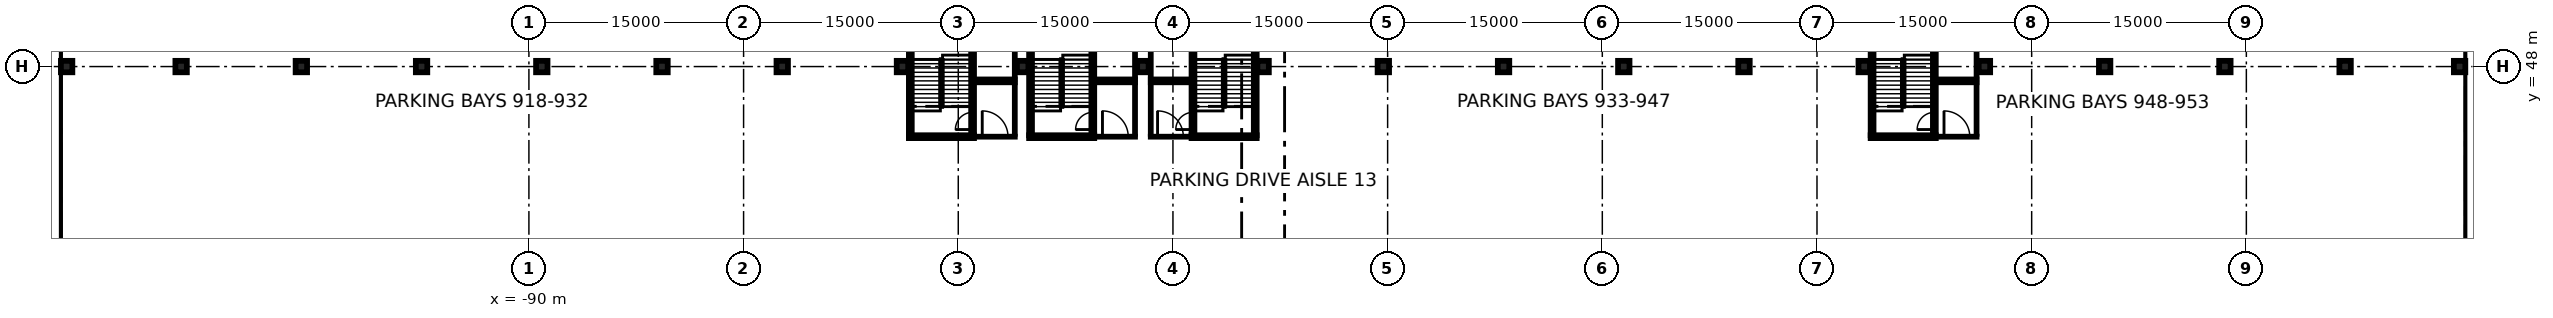
"""IFC4 building model, lengths in metres.
Left out: names, types, materials, properties, quantities, classifications, styles, units other than length and angle.
Written with IfcOpenShell. Run it as: python <this file> out.ifc"""

import sys

from ifc_helpers import new_model, si_unit, direction, frame, frame_2d, origin, origin_2d, place, context, subcontext, project, spatial, rectangle, extrude, element, fill, save


model = new_model("IFC4")
c1 = context("Model", 3, precision=1e-05, world=origin(), true_north=direction((0.0, 1.0)))
c2 = subcontext(c1, "Body", "Model", "MODEL_VIEW")
j1 = project(units=[si_unit("LENGTHUNIT", "METRE"), si_unit("PLANEANGLEUNIT", "RADIAN")], contexts=[c1])
p1 = place(None, origin())
s1 = spatial("IfcSite", under=j1, at=p1, CompositionType="ELEMENT")
p2 = place(p1, origin())
s2 = spatial("IfcBuilding", under=s1, at=p2, CompositionType="ELEMENT")
p3 = place(p2, frame((0.0, 0.0, -12.0)))
s3 = spatial("IfcBuildingStorey", under=s2, at=p3, CompositionType="ELEMENT", Elevation=-12.0)
for number, where, z_axis, x_axis in (
    (1, (-123.15, -80.0, 0.0), (0.0, 0.0, 1.0), (0.0, 1.0, 0.0)),
    (2, (45.75, -80.0, 0.0), (0.0, 0.0, 1.0), (0.0, 1.0, 0.0)),
):
    element("IfcWall", number, at=place(p3, frame(where, z_axis=z_axis, x_axis=x_axis)), inside=s3, PredefinedType="USERDEFINED", context=c2, shape_type="SweptSolid", body=[
        extrude(rectangle(XDim=160.0, YDim=0.9, at=frame_2d((80.0, 0.0))), origin(), (0.0, 0.0, 1.0), 11.55),
    ])
p4 = place(p2, frame((0.0, 0.0, -7.2)))
s4 = spatial("IfcBuildingStorey", under=s2, at=p4, CompositionType="ELEMENT", Elevation=-7.2)
for number, where, z_axis, x_axis in (
    (3, (-122.3, 48.0, -0.4), (0.0, 0.0, 1.0), (1.0, 0.0, 0.0)),
    (4, (-114.3, 48.0, -0.4), (0.0, 0.0, 1.0), (1.0, 0.0, 0.0)),
    (5, (-105.9, 48.0, -0.4), (0.0, 0.0, 1.0), (1.0, 0.0, 0.0)),
    (6, (-97.5, 48.0, -0.4), (0.0, 0.0, 1.0), (1.0, 0.0, 0.0)),
    (7, (-89.1, 48.0, -0.4), (0.0, 0.0, 1.0), (1.0, 0.0, 0.0)),
    (8, (-80.7, 48.0, -0.4), (0.0, 0.0, 1.0), (1.0, 0.0, 0.0)),
    (9, (-72.3, 48.0, -0.4), (0.0, 0.0, 1.0), (1.0, 0.0, 0.0)),
    (10, (-63.9, 48.0, -0.4), (0.0, 0.0, 1.0), (1.0, 0.0, 0.0)),
    (11, (-55.5, 48.0, -0.4), (0.0, 0.0, 1.0), (1.0, 0.0, 0.0)),
    (12, (-47.1, 48.0, -0.4), (0.0, 0.0, 1.0), (1.0, 0.0, 0.0)),
    (13, (-38.7, 48.0, -0.4), (0.0, 0.0, 1.0), (1.0, 0.0, 0.0)),
    (14, (-30.3, 48.0, -0.4), (0.0, 0.0, 1.0), (1.0, 0.0, 0.0)),
    (15, (-21.9, 48.0, -0.4), (0.0, 0.0, 1.0), (1.0, 0.0, 0.0)),
    (16, (-13.5, 48.0, -0.4), (0.0, 0.0, 1.0), (1.0, 0.0, 0.0)),
    (17, (-5.1, 48.0, -0.4), (0.0, 0.0, 1.0), (1.0, 0.0, 0.0)),
    (18, (3.3, 48.0, -0.4), (0.0, 0.0, 1.0), (1.0, 0.0, 0.0)),
    (19, (11.7, 48.0, -0.4), (0.0, 0.0, 1.0), (1.0, 0.0, 0.0)),
    (20, (20.1, 48.0, -0.4), (0.0, 0.0, 1.0), (1.0, 0.0, 0.0)),
    (21, (28.5, 48.0, -0.4), (0.0, 0.0, 1.0), (1.0, 0.0, 0.0)),
    (22, (36.9, 48.0, -0.4), (0.0, 0.0, 1.0), (1.0, 0.0, 0.0)),
    (23, (44.9, 48.0, -0.4), (0.0, 0.0, 1.0), (1.0, 0.0, 0.0)),
):
    element("IfcColumn", number, at=place(p4, frame(where, z_axis=z_axis, x_axis=x_axis)), inside=s4, PredefinedType="COLUMN", context=c2, shape_type="SweptSolid", body=[
        extrude(rectangle(XDim=0.8, YDim=0.8, at=origin_2d()), origin(), (0.0, 0.0, 1.0), 3.6),
    ])
p5 = place(p4, frame((-58.9, 43.1, 0.0), z_axis=(0.0, 0.0, 1.0), x_axis=(1.0, 0.0, 0.0)))
e24 = element("IfcWall", 24, at=p5, inside=s4, PredefinedType="PARTITIONING", context=c2, shape_type="SweptSolid", body=[
    extrude(rectangle(XDim=2.95, YDim=0.2, at=frame_2d((1.475, 0.0))), origin(), (0.0, 0.0, 1.0), 3.2),
])
p6 = place(p5, frame((0.575, 0.0, 0.0)))
e25 = element("IfcOpeningElement", 25, at=p6, cuts=e24, PredefinedType="OPENING", context=c2, shape_type="SweptSolid", body=[
    extrude(rectangle(XDim=1.8, YDim=2.1, at=frame_2d((0.9, 1.05))), frame((0.0, 0.11, 0.0), z_axis=(0.0, -1.0, 0.0), x_axis=(1.0, 0.0, 0.0)), (0.0, 0.0, 1.0), 0.22),
])
p7 = place(p4, frame((-58.9, 46.9, 0.0), z_axis=(0.0, 0.0, 1.0), x_axis=(1.0, 0.0, 0.0)))
e26 = element("IfcWall", 26, at=p7, inside=s4, PredefinedType="PARTITIONING", context=c2, shape_type="SweptSolid", body=[
    extrude(rectangle(XDim=2.95, YDim=0.2, at=frame_2d((1.475, 0.0))), origin(), (0.0, 0.0, 1.0), 3.2),
])
p8 = place(p4, frame((-56.05, 43.2, 0.0), z_axis=(0.0, 0.0, 1.0), x_axis=(0.0, 1.0, 0.0)))
e27 = element("IfcWall", 27, at=p8, inside=s4, PredefinedType="PARTITIONING", context=c2, shape_type="SweptSolid", body=[
    extrude(rectangle(XDim=3.6, YDim=0.2, at=frame_2d((1.8, 0.0))), origin(), (0.0, 0.0, 1.0), 3.2),
])
p9 = place(p4, frame((-58.9, 47.1, 0.0), z_axis=(0.0, 0.0, 1.0), x_axis=(1.0, 0.0, 0.0)))
e28 = element("IfcWall", 28, at=p9, inside=s4, PredefinedType="PARTITIONING", context=c2, shape_type="SweptSolid", body=[
    extrude(rectangle(XDim=2.95, YDim=0.2, at=frame_2d((1.475, 0.0))), origin(), (0.0, 0.0, 1.0), 3.2),
])
p10 = place(p4, frame((-56.05, 47.2, 0.0), z_axis=(0.0, 0.0, 1.0), x_axis=(0.0, 1.0, 0.0)))
e29 = element("IfcWall", 29, at=p10, inside=s4, PredefinedType="PARTITIONING", context=c2, shape_type="SweptSolid", body=[
    extrude(rectangle(XDim=5.6, YDim=0.2, at=frame_2d((2.8, 0.0))), origin(), (0.0, 0.0, 1.0), 3.2),
])
p11 = place(p4, frame((-50.5, 43.1, 0.0), z_axis=(0.0, 0.0, 1.0), x_axis=(1.0, 0.0, 0.0)))
e30 = element("IfcWall", 30, at=p11, inside=s4, PredefinedType="PARTITIONING", context=c2, shape_type="SweptSolid", body=[
    extrude(rectangle(XDim=2.95, YDim=0.2, at=frame_2d((1.475, 0.0))), origin(), (0.0, 0.0, 1.0), 3.2),
])
p12 = place(p11, frame((0.575, 0.0, 0.0)))
e31 = element("IfcOpeningElement", 31, at=p12, cuts=e30, PredefinedType="OPENING", context=c2, shape_type="SweptSolid", body=[
    extrude(rectangle(XDim=1.8, YDim=2.1, at=frame_2d((0.9, 1.05))), frame((0.0, 0.11, 0.0), z_axis=(0.0, -1.0, 0.0), x_axis=(1.0, 0.0, 0.0)), (0.0, 0.0, 1.0), 0.22),
])
p13 = place(p4, frame((-50.5, 46.9, 0.0), z_axis=(0.0, 0.0, 1.0), x_axis=(1.0, 0.0, 0.0)))
e32 = element("IfcWall", 32, at=p13, inside=s4, PredefinedType="PARTITIONING", context=c2, shape_type="SweptSolid", body=[
    extrude(rectangle(XDim=2.95, YDim=0.2, at=frame_2d((1.475, 0.0))), origin(), (0.0, 0.0, 1.0), 3.2),
])
p14 = place(p4, frame((-47.65, 43.2, 0.0), z_axis=(0.0, 0.0, 1.0), x_axis=(0.0, 1.0, 0.0)))
e33 = element("IfcWall", 33, at=p14, inside=s4, PredefinedType="PARTITIONING", context=c2, shape_type="SweptSolid", body=[
    extrude(rectangle(XDim=3.6, YDim=0.2, at=frame_2d((1.8, 0.0))), origin(), (0.0, 0.0, 1.0), 3.2),
])
p15 = place(p4, frame((-50.5, 47.1, 0.0), z_axis=(0.0, 0.0, 1.0), x_axis=(1.0, 0.0, 0.0)))
e34 = element("IfcWall", 34, at=p15, inside=s4, PredefinedType="PARTITIONING", context=c2, shape_type="SweptSolid", body=[
    extrude(rectangle(XDim=2.95, YDim=0.2, at=frame_2d((1.475, 0.0))), origin(), (0.0, 0.0, 1.0), 3.2),
])
p16 = place(p4, frame((-47.65, 47.2, 0.0), z_axis=(0.0, 0.0, 1.0), x_axis=(0.0, 1.0, 0.0)))
e35 = element("IfcWall", 35, at=p16, inside=s4, PredefinedType="PARTITIONING", context=c2, shape_type="SweptSolid", body=[
    extrude(rectangle(XDim=5.6, YDim=0.2, at=frame_2d((2.8, 0.0))), origin(), (0.0, 0.0, 1.0), 3.2),
])
p17 = place(p4, frame((8.3, 43.1, 0.0), z_axis=(0.0, 0.0, 1.0), x_axis=(1.0, 0.0, 0.0)))
e36 = element("IfcWall", 36, at=p17, inside=s4, PredefinedType="PARTITIONING", context=c2, shape_type="SweptSolid", body=[
    extrude(rectangle(XDim=2.95, YDim=0.2, at=frame_2d((1.475, 0.0))), origin(), (0.0, 0.0, 1.0), 3.2),
])
p18 = place(p17, frame((0.575, 0.0, 0.0)))
e37 = element("IfcOpeningElement", 37, at=p18, cuts=e36, PredefinedType="OPENING", context=c2, shape_type="SweptSolid", body=[
    extrude(rectangle(XDim=1.8, YDim=2.1, at=frame_2d((0.9, 1.05))), frame((0.0, 0.11, 0.0), z_axis=(0.0, -1.0, 0.0), x_axis=(1.0, 0.0, 0.0)), (0.0, 0.0, 1.0), 0.22),
])
p19 = place(p4, frame((8.3, 46.9, 0.0), z_axis=(0.0, 0.0, 1.0), x_axis=(1.0, 0.0, 0.0)))
e38 = element("IfcWall", 38, at=p19, inside=s4, PredefinedType="PARTITIONING", context=c2, shape_type="SweptSolid", body=[
    extrude(rectangle(XDim=2.95, YDim=0.2, at=frame_2d((1.475, 0.0))), origin(), (0.0, 0.0, 1.0), 3.2),
])
p20 = place(p4, frame((11.15, 43.2, 0.0), z_axis=(0.0, 0.0, 1.0), x_axis=(0.0, 1.0, 0.0)))
e39 = element("IfcWall", 39, at=p20, inside=s4, PredefinedType="PARTITIONING", context=c2, shape_type="SweptSolid", body=[
    extrude(rectangle(XDim=3.6, YDim=0.2, at=frame_2d((1.8, 0.0))), origin(), (0.0, 0.0, 1.0), 3.2),
])
p21 = place(p4, frame((8.3, 47.1, 0.0), z_axis=(0.0, 0.0, 1.0), x_axis=(1.0, 0.0, 0.0)))
e40 = element("IfcWall", 40, at=p21, inside=s4, PredefinedType="PARTITIONING", context=c2, shape_type="SweptSolid", body=[
    extrude(rectangle(XDim=2.95, YDim=0.2, at=frame_2d((1.475, 0.0))), origin(), (0.0, 0.0, 1.0), 3.2),
])
p22 = place(p4, frame((11.15, 47.2, 0.0), z_axis=(0.0, 0.0, 1.0), x_axis=(0.0, 1.0, 0.0)))
e41 = element("IfcWall", 41, at=p22, inside=s4, PredefinedType="PARTITIONING", context=c2, shape_type="SweptSolid", body=[
    extrude(rectangle(XDim=5.6, YDim=0.2, at=frame_2d((2.8, 0.0))), origin(), (0.0, 0.0, 1.0), 3.2),
])
p23 = place(p4, frame((-46.65, 43.1, 0.0), z_axis=(0.0, 0.0, 1.0), x_axis=(1.0, 0.0, 0.0)))
e42 = element("IfcWall", 42, at=p23, inside=s4, PredefinedType="PARTITIONING", context=c2, shape_type="SweptSolid", body=[
    extrude(rectangle(XDim=2.95, YDim=0.2, at=frame_2d((1.475, 0.0))), origin(), (0.0, 0.0, 1.0), 3.2),
])
p24 = place(p23, frame((0.575, 0.0, 0.0)))
e43 = element("IfcOpeningElement", 43, at=p24, cuts=e42, PredefinedType="OPENING", context=c2, shape_type="SweptSolid", body=[
    extrude(rectangle(XDim=1.8, YDim=2.1, at=frame_2d((0.9, 1.05))), frame((0.0, 0.11, 0.0), z_axis=(0.0, -1.0, 0.0), x_axis=(1.0, 0.0, 0.0)), (0.0, 0.0, 1.0), 0.22),
])
p25 = place(p4, frame((-46.65, 46.9, 0.0), z_axis=(0.0, 0.0, 1.0), x_axis=(1.0, 0.0, 0.0)))
e44 = element("IfcWall", 44, at=p25, inside=s4, PredefinedType="PARTITIONING", context=c2, shape_type="SweptSolid", body=[
    extrude(rectangle(XDim=2.95, YDim=0.2, at=frame_2d((1.475, 0.0))), origin(), (0.0, 0.0, 1.0), 3.2),
])
p26 = place(p4, frame((-46.55, 43.2, 0.0), z_axis=(0.0, 0.0, 1.0), x_axis=(0.0, 1.0, 0.0)))
e45 = element("IfcWall", 45, at=p26, inside=s4, PredefinedType="PARTITIONING", context=c2, shape_type="SweptSolid", body=[
    extrude(rectangle(XDim=3.6, YDim=0.2, at=frame_2d((1.8, 0.0))), origin(), (0.0, 0.0, 1.0), 3.2),
])
p27 = place(p4, frame((-46.65, 47.1, 0.0), z_axis=(0.0, 0.0, 1.0), x_axis=(1.0, 0.0, 0.0)))
e46 = element("IfcWall", 46, at=p27, inside=s4, PredefinedType="PARTITIONING", context=c2, shape_type="SweptSolid", body=[
    extrude(rectangle(XDim=2.95, YDim=0.2, at=frame_2d((1.475, 0.0))), origin(), (0.0, 0.0, 1.0), 3.2),
])
p28 = place(p4, frame((-46.55, 47.2, 0.0), z_axis=(0.0, 0.0, 1.0), x_axis=(0.0, 1.0, 0.0)))
e47 = element("IfcWall", 47, at=p28, inside=s4, PredefinedType="PARTITIONING", context=c2, shape_type="SweptSolid", body=[
    extrude(rectangle(XDim=5.6, YDim=0.2, at=frame_2d((2.8, 0.0))), origin(), (0.0, 0.0, 1.0), 3.2),
])
p29 = place(p4, frame((-63.35, 43.2, 0.0), z_axis=(0.0, 0.0, 1.0), x_axis=(0.0, 1.0, 0.0)))
e48 = element("IfcWall", 48, at=p29, inside=s4, PredefinedType="SOLIDWALL", context=c2, shape_type="SweptSolid", body=[
    extrude(rectangle(XDim=9.6, YDim=0.2, at=frame_2d((4.8, 0.0))), origin(), (0.0, 0.0, 1.0), 3.2),
])
p30 = place(p4, frame((-59.0, 43.2, 0.0), z_axis=(0.0, 0.0, 1.0), x_axis=(0.0, 1.0, 0.0)))
e49 = element("IfcWall", 49, at=p30, inside=s4, PredefinedType="SOLIDWALL", context=c2, shape_type="SweptSolid", body=[
    extrude(rectangle(XDim=9.6, YDim=0.2, at=frame_2d((4.8, 0.0))), origin(), (0.0, 0.0, 1.0), 3.2),
])
p31 = place(p30, frame((0.4, 0.0, 0.0)))
e50 = element("IfcOpeningElement", 50, at=p31, cuts=e49, PredefinedType="OPENING", context=c2, shape_type="SweptSolid", body=[
    extrude(rectangle(XDim=1.2, YDim=2.1, at=frame_2d((0.6, 1.05))), frame((0.0, 0.11, 0.0), z_axis=(0.0, -1.0, 0.0), x_axis=(1.0, 0.0, 0.0)), (0.0, 0.0, 1.0), 0.22),
])
p32 = place(p4, frame((-58.9, 43.1, 0.0), z_axis=(0.0, 0.0, 1.0), x_axis=(-1.0, 0.0, 0.0)))
e51 = element("IfcWall", 51, at=p32, inside=s4, PredefinedType="SOLIDWALL", context=c2, shape_type="SweptSolid", body=[
    extrude(rectangle(XDim=4.55, YDim=0.2, at=frame_2d((2.275, 0.0))), origin(), (0.0, 0.0, 1.0), 3.2),
])
p33 = place(p4, frame((-54.95, 43.2, 0.0), z_axis=(0.0, 0.0, 1.0), x_axis=(0.0, 1.0, 0.0)))
e52 = element("IfcWall", 52, at=p33, inside=s4, PredefinedType="SOLIDWALL", context=c2, shape_type="SweptSolid", body=[
    extrude(rectangle(XDim=9.6, YDim=0.2, at=frame_2d((4.8, 0.0))), origin(), (0.0, 0.0, 1.0), 3.2),
])
p34 = place(p4, frame((-50.6, 43.2, 0.0), z_axis=(0.0, 0.0, 1.0), x_axis=(0.0, 1.0, 0.0)))
e53 = element("IfcWall", 53, at=p34, inside=s4, PredefinedType="SOLIDWALL", context=c2, shape_type="SweptSolid", body=[
    extrude(rectangle(XDim=9.6, YDim=0.2, at=frame_2d((4.8, 0.0))), origin(), (0.0, 0.0, 1.0), 3.2),
])
p35 = place(p34, frame((0.4, 0.0, 0.0)))
e54 = element("IfcOpeningElement", 54, at=p35, cuts=e53, PredefinedType="OPENING", context=c2, shape_type="SweptSolid", body=[
    extrude(rectangle(XDim=1.2, YDim=2.1, at=frame_2d((0.6, 1.05))), frame((0.0, 0.11, 0.0), z_axis=(0.0, -1.0, 0.0), x_axis=(1.0, 0.0, 0.0)), (0.0, 0.0, 1.0), 0.22),
])
p36 = place(p4, frame((-50.5, 43.1, 0.0), z_axis=(0.0, 0.0, 1.0), x_axis=(-1.0, 0.0, 0.0)))
e55 = element("IfcWall", 55, at=p36, inside=s4, PredefinedType="SOLIDWALL", context=c2, shape_type="SweptSolid", body=[
    extrude(rectangle(XDim=4.55, YDim=0.2, at=frame_2d((2.275, 0.0))), origin(), (0.0, 0.0, 1.0), 3.2),
])
p37 = place(p4, frame((3.85, 43.2, 0.0), z_axis=(0.0, 0.0, 1.0), x_axis=(0.0, 1.0, 0.0)))
e56 = element("IfcWall", 56, at=p37, inside=s4, PredefinedType="SOLIDWALL", context=c2, shape_type="SweptSolid", body=[
    extrude(rectangle(XDim=9.6, YDim=0.2, at=frame_2d((4.8, 0.0))), origin(), (0.0, 0.0, 1.0), 3.2),
])
p38 = place(p4, frame((8.2, 43.2, 0.0), z_axis=(0.0, 0.0, 1.0), x_axis=(0.0, 1.0, 0.0)))
e57 = element("IfcWall", 57, at=p38, inside=s4, PredefinedType="SOLIDWALL", context=c2, shape_type="SweptSolid", body=[
    extrude(rectangle(XDim=9.6, YDim=0.2, at=frame_2d((4.8, 0.0))), origin(), (0.0, 0.0, 1.0), 3.2),
])
p39 = place(p38, frame((0.4, 0.0, 0.0)))
e58 = element("IfcOpeningElement", 58, at=p39, cuts=e57, PredefinedType="OPENING", context=c2, shape_type="SweptSolid", body=[
    extrude(rectangle(XDim=1.2, YDim=2.1, at=frame_2d((0.6, 1.05))), frame((0.0, 0.11, 0.0), z_axis=(0.0, -1.0, 0.0), x_axis=(1.0, 0.0, 0.0)), (0.0, 0.0, 1.0), 0.22),
])
p40 = place(p4, frame((8.3, 43.1, 0.0), z_axis=(0.0, 0.0, 1.0), x_axis=(-1.0, 0.0, 0.0)))
e59 = element("IfcWall", 59, at=p40, inside=s4, PredefinedType="SOLIDWALL", context=c2, shape_type="SweptSolid", body=[
    extrude(rectangle(XDim=4.55, YDim=0.2, at=frame_2d((2.275, 0.0))), origin(), (0.0, 0.0, 1.0), 3.2),
])
p41 = place(p4, frame((-43.6, 43.2, 0.0), z_axis=(0.0, 0.0, 1.0), x_axis=(0.0, 1.0, 0.0)))
e60 = element("IfcWall", 60, at=p41, inside=s4, PredefinedType="SOLIDWALL", context=c2, shape_type="SweptSolid", body=[
    extrude(rectangle(XDim=9.6, YDim=0.2, at=frame_2d((4.8, 0.0))), origin(), (0.0, 0.0, 1.0), 3.2),
])
p42 = place(p41, frame((0.4, 0.0, 0.0)))
e61 = element("IfcOpeningElement", 61, at=p42, cuts=e60, PredefinedType="OPENING", context=c2, shape_type="SweptSolid", body=[
    extrude(rectangle(XDim=1.2, YDim=2.1, at=frame_2d((0.6, 1.05))), frame((0.0, 0.11, 0.0), z_axis=(0.0, -1.0, 0.0), x_axis=(1.0, 0.0, 0.0)), (0.0, 0.0, 1.0), 0.22),
])
p43 = place(p4, frame((-39.25, 43.2, 0.0), z_axis=(0.0, 0.0, 1.0), x_axis=(0.0, 1.0, 0.0)))
e62 = element("IfcWall", 62, at=p43, inside=s4, PredefinedType="SOLIDWALL", context=c2, shape_type="SweptSolid", body=[
    extrude(rectangle(XDim=9.6, YDim=0.2, at=frame_2d((4.8, 0.0))), origin(), (0.0, 0.0, 1.0), 3.2),
])
p44 = place(p4, frame((-39.15, 43.1, 0.0), z_axis=(0.0, 0.0, 1.0), x_axis=(-1.0, 0.0, 0.0)))
e63 = element("IfcWall", 63, at=p44, inside=s4, PredefinedType="SOLIDWALL", context=c2, shape_type="SweptSolid", body=[
    extrude(rectangle(XDim=4.55, YDim=0.2, at=frame_2d((2.275, 0.0))), origin(), (0.0, 0.0, 1.0), 3.2),
])
p45 = place(p6, origin())
e64 = element("IfcDoor", 64, at=p45, inside=s4, OperationType="DOUBLE_DOOR_SINGLE_SWING", PredefinedType="DOOR", context=c2, shape_type="SweptSolid", body=[
    extrude(rectangle(XDim=1.8, YDim=2.1, at=frame_2d((0.9, 1.05))), frame((0.0, 0.025, 0.0), z_axis=(0.0, -1.0, 0.0), x_axis=(1.0, 0.0, 0.0)), (0.0, 0.0, 1.0), 0.05),
])
fill(e25, e64)
p46 = place(p12, origin())
e65 = element("IfcDoor", 65, at=p46, inside=s4, OperationType="DOUBLE_DOOR_SINGLE_SWING", PredefinedType="DOOR", context=c2, shape_type="SweptSolid", body=[
    extrude(rectangle(XDim=1.8, YDim=2.1, at=frame_2d((0.9, 1.05))), frame((0.0, 0.025, 0.0), z_axis=(0.0, -1.0, 0.0), x_axis=(1.0, 0.0, 0.0)), (0.0, 0.0, 1.0), 0.05),
])
fill(e31, e65)
p47 = place(p18, origin())
e66 = element("IfcDoor", 66, at=p47, inside=s4, OperationType="DOUBLE_DOOR_SINGLE_SWING", PredefinedType="DOOR", context=c2, shape_type="SweptSolid", body=[
    extrude(rectangle(XDim=1.8, YDim=2.1, at=frame_2d((0.9, 1.05))), frame((0.0, 0.025, 0.0), z_axis=(0.0, -1.0, 0.0), x_axis=(1.0, 0.0, 0.0)), (0.0, 0.0, 1.0), 0.05),
])
fill(e37, e66)
p48 = place(p24, origin())
e67 = element("IfcDoor", 67, at=p48, inside=s4, OperationType="DOUBLE_DOOR_SINGLE_SWING", PredefinedType="DOOR", context=c2, shape_type="SweptSolid", body=[
    extrude(rectangle(XDim=1.8, YDim=2.1, at=frame_2d((0.9, 1.05))), frame((0.0, 0.025, 0.0), z_axis=(0.0, -1.0, 0.0), x_axis=(1.0, 0.0, 0.0)), (0.0, 0.0, 1.0), 0.05),
])
fill(e43, e67)
p49 = place(p31, origin())
e68 = element("IfcDoor", 68, at=p49, inside=s4, OperationType="SINGLE_SWING_LEFT", PredefinedType="DOOR", context=c2, shape_type="SweptSolid", body=[
    extrude(rectangle(XDim=1.2, YDim=2.1, at=frame_2d((0.6, 1.05))), frame((0.0, 0.025, 0.0), z_axis=(0.0, -1.0, 0.0), x_axis=(1.0, 0.0, 0.0)), (0.0, 0.0, 1.0), 0.05),
])
fill(e50, e68)
p50 = place(p35, origin())
e69 = element("IfcDoor", 69, at=p50, inside=s4, OperationType="SINGLE_SWING_LEFT", PredefinedType="DOOR", context=c2, shape_type="SweptSolid", body=[
    extrude(rectangle(XDim=1.2, YDim=2.1, at=frame_2d((0.6, 1.05))), frame((0.0, 0.025, 0.0), z_axis=(0.0, -1.0, 0.0), x_axis=(1.0, 0.0, 0.0)), (0.0, 0.0, 1.0), 0.05),
])
fill(e54, e69)
p51 = place(p39, origin())
e70 = element("IfcDoor", 70, at=p51, inside=s4, OperationType="SINGLE_SWING_LEFT", PredefinedType="DOOR", context=c2, shape_type="SweptSolid", body=[
    extrude(rectangle(XDim=1.2, YDim=2.1, at=frame_2d((0.6, 1.05))), frame((0.0, 0.025, 0.0), z_axis=(0.0, -1.0, 0.0), x_axis=(1.0, 0.0, 0.0)), (0.0, 0.0, 1.0), 0.05),
])
fill(e58, e70)
p52 = place(p42, origin())
e71 = element("IfcDoor", 71, at=p52, inside=s4, OperationType="SINGLE_SWING_LEFT", PredefinedType="DOOR", context=c2, shape_type="SweptSolid", body=[
    extrude(rectangle(XDim=1.2, YDim=2.1, at=frame_2d((0.6, 1.05))), frame((0.0, 0.025, 0.0), z_axis=(0.0, -1.0, 0.0), x_axis=(1.0, 0.0, 0.0)), (0.0, 0.0, 1.0), 0.05),
])
fill(e61, e71)
save(model, sys.argv[1])
